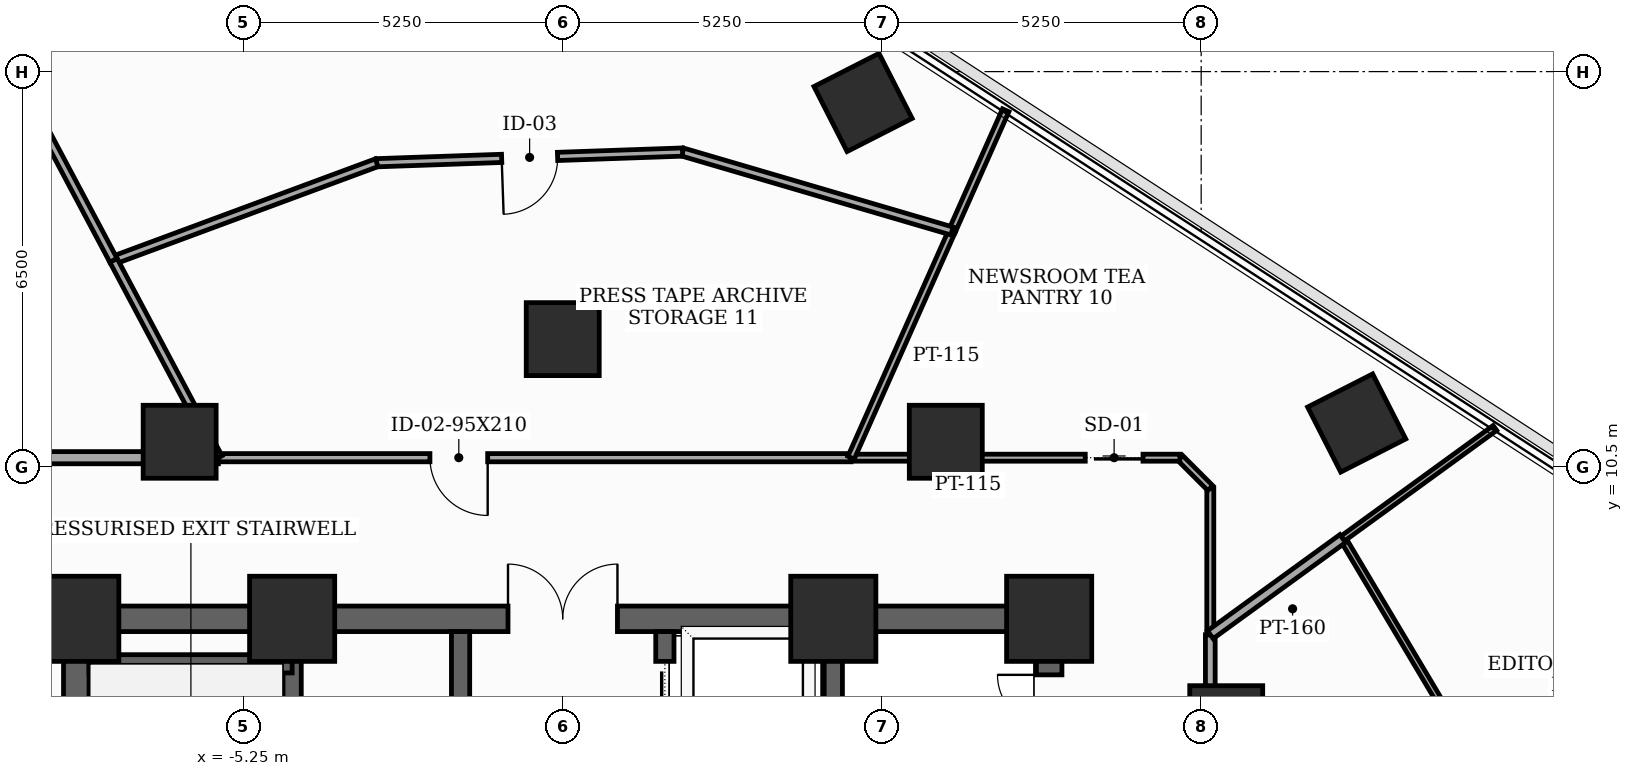
"""IFC4 building model, lengths in metres.
Left out: names, types, materials, properties, quantities, classifications, styles, units other than length and angle.
Written with IfcOpenShell. Run it as: python <this file> out.ifc"""

import sys

from ifc_helpers import new_model, si_unit, direction, frame, frame_2d, origin, origin_2d, place, context, subcontext, project, spatial, rectangle, extrude, element, fill, save


model = new_model("IFC4")
c1 = context("Model", 3, precision=1e-05, world=origin(), true_north=direction((0.0, 1.0)))
c2 = subcontext(c1, "Body", "Model", "MODEL_VIEW")
j1 = project(units=[si_unit("LENGTHUNIT", "METRE"), si_unit("PLANEANGLEUNIT", "RADIAN")], contexts=[c1])
p1 = place(None, origin())
s1 = spatial("IfcSite", under=j1, at=p1, CompositionType="ELEMENT")
p2 = place(p1, origin())
s2 = spatial("IfcBuilding", under=s1, at=p2, CompositionType="ELEMENT")
p3 = place(p2, frame((0.0, 0.0, 145.8)))
s3 = spatial("IfcBuildingStorey", under=s2, at=p3, CompositionType="ELEMENT", Elevation=145.8)
for number, where, z_axis, x_axis in (
    (1, (8.0, 8.0, 0.0), (0.0, 0.0, 1.0), (1.0, 0.0, 0.0)),
    (2, (4.45, 8.0, 0.0), (0.0, 0.0, 1.0), (1.0, 0.0, 0.0)),
    (3, (-4.45, 8.0, 0.0), (0.0, 0.0, 1.0), (1.0, 0.0, 0.0)),
    (4, (-8.0, 8.0, 0.0), (0.0, 0.0, 1.0), (1.0, 0.0, 0.0)),
):
    element("IfcColumn", number, at=place(p3, frame(where, z_axis=z_axis, x_axis=x_axis)), inside=s3, PredefinedType="COLUMN", context=c2, shape_type="SweptSolid", body=[
        extrude(rectangle(XDim=1.4, YDim=1.4, at=origin_2d()), origin(), (0.0, 0.0, 1.0), 3.7),
    ])
for number, where, z_axis, x_axis in (
    (5, (10.912, 6.3, 0.0), (0.0, 0.0, 1.0), (1.0, 0.0, 0.0)),
    (6, (6.3, 10.912, 0.0), (0.0, 0.0, 1.0), (1.0, 0.0, 0.0)),
    (7, (0.0, 12.6, 0.0), (0.0, 0.0, 1.0), (1.0, 0.0, 0.0)),
    (8, (-6.3, 10.912, 0.0), (0.0, 0.0, 1.0), (1.0, 0.0, 0.0)),
    (9, (13.058, 11.22, 0.0), (0.0, 0.0, 1.0), (0.891, 0.454, 0.0)),
    (10, (4.939, 16.492, 0.0), (0.0, 0.0, 1.0), (0.891, 0.454, 0.0)),
):
    element("IfcColumn", number, at=place(p3, frame(where, z_axis=z_axis, x_axis=x_axis)), inside=s3, PredefinedType="COLUMN", context=c2, shape_type="SweptSolid", body=[
        extrude(rectangle(XDim=1.2, YDim=1.2, at=origin_2d()), origin(), (0.0, 0.0, 1.0), 3.7),
    ])
p4 = place(p3, frame((-8.0, -8.0, 0.0), z_axis=(0.0, 0.0, 1.0), x_axis=(0.0, 1.0, 0.0)))
e11 = element("IfcWall", 11, at=p4, inside=s3, PredefinedType="SHEAR", context=c2, shape_type="SweptSolid", body=[
    extrude(rectangle(XDim=16.0, YDim=0.42, at=frame_2d((8.0, 0.0))), origin(), (0.0, 0.0, 1.0), 3.46),
])
p5 = place(p4, frame((0.922, 0.0, 0.0)))
e12 = element("IfcOpeningElement", 12, at=p5, cuts=e11, PredefinedType="OPENING", context=c2, shape_type="SweptSolid", body=[
    extrude(rectangle(XDim=0.85, YDim=2.02, at=frame_2d((0.425, 1.01))), frame((0.0, 0.22, 0.0), z_axis=(0.0, -1.0, 0.0), x_axis=(1.0, 0.0, 0.0)), (0.0, 0.0, 1.0), 0.44),
])
p6 = place(p4, frame((5.35, 0.0, 0.0)))
e13 = element("IfcOpeningElement", 13, at=p6, cuts=e11, PredefinedType="OPENING", context=c2, shape_type="SweptSolid", body=[
    extrude(rectangle(XDim=1.05, YDim=2.15, at=frame_2d((0.525, 1.075))), frame((0.0, 0.22, 0.0), z_axis=(0.0, -1.0, 0.0), x_axis=(1.0, 0.0, 0.0)), (0.0, 0.0, 1.0), 0.44),
])
p7 = place(p3, frame((8.0, -8.0, 0.0), z_axis=(0.0, 0.0, 1.0), x_axis=(0.0, 1.0, 0.0)))
e14 = element("IfcWall", 14, at=p7, inside=s3, PredefinedType="SHEAR", context=c2, shape_type="SweptSolid", body=[
    extrude(rectangle(XDim=16.0, YDim=0.42, at=frame_2d((8.0, 0.0))), origin(), (0.0, 0.0, 1.0), 3.46),
])
p8 = place(p7, frame((9.6, 0.0, 0.0)))
e15 = element("IfcOpeningElement", 15, at=p8, cuts=e14, PredefinedType="OPENING", context=c2, shape_type="SweptSolid", body=[
    extrude(rectangle(XDim=1.05, YDim=2.15, at=frame_2d((0.525, 1.075))), frame((0.0, 0.22, 0.0), z_axis=(0.0, -1.0, 0.0), x_axis=(1.0, 0.0, 0.0)), (0.0, 0.0, 1.0), 0.44),
])
p9 = place(p7, frame((14.229, 0.0, 0.0)))
e16 = element("IfcOpeningElement", 16, at=p9, cuts=e14, PredefinedType="OPENING", context=c2, shape_type="SweptSolid", body=[
    extrude(rectangle(XDim=0.85, YDim=2.02, at=frame_2d((0.425, 1.01))), frame((0.0, 0.22, 0.0), z_axis=(0.0, -1.0, 0.0), x_axis=(1.0, 0.0, 0.0)), (0.0, 0.0, 1.0), 0.44),
])
p10 = place(p3, frame((-8.0, 8.0, 0.0), z_axis=(0.0, 0.0, 1.0), x_axis=(1.0, 0.0, 0.0)))
e17 = element("IfcWall", 17, at=p10, inside=s3, PredefinedType="SHEAR", context=c2, shape_type="SweptSolid", body=[
    extrude(rectangle(XDim=16.0, YDim=0.42, at=frame_2d((8.0, 0.0))), origin(), (0.0, 0.0, 1.0), 3.46),
])
p11 = place(p10, frame((7.1, 0.0, 0.0)))
e18 = element("IfcOpeningElement", 18, at=p11, cuts=e17, PredefinedType="OPENING", context=c2, shape_type="SweptSolid", body=[
    extrude(rectangle(XDim=1.8, YDim=2.15, at=frame_2d((0.9, 1.075))), frame((0.0, 0.22, 0.0), z_axis=(0.0, -1.0, 0.0), x_axis=(1.0, 0.0, 0.0)), (0.0, 0.0, 1.0), 0.44),
])
for number, where, z_axis, x_axis in (
    (19, (-4.45, -7.79, 0.0), (0.0, 0.0, 1.0), (0.0, 1.0, 0.0)),
    (20, (4.45, -7.79, 0.0), (0.0, 0.0, 1.0), (0.0, 1.0, 0.0)),
):
    element("IfcWall", number, at=place(p3, frame(where, z_axis=z_axis, x_axis=x_axis)), inside=s3, PredefinedType="SHEAR", context=c2, shape_type="SweptSolid", body=[
        extrude(rectangle(XDim=15.58, YDim=0.3, at=frame_2d((7.79, 0.0))), origin(), (0.0, 0.0, 1.0), 3.46),
    ])
p12 = place(p3, frame((-7.79, 7.26, 0.0), z_axis=(0.0, 0.0, 1.0), x_axis=(1.0, 0.0, 0.0)))
e21 = element("IfcWall", 21, at=p12, inside=s3, PredefinedType="SHEAR", context=c2, shape_type="SweptSolid", body=[
    extrude(rectangle(XDim=3.34, YDim=0.3, at=frame_2d((1.67, 0.0))), origin(), (0.0, 0.0, 1.0), 3.46),
])
p13 = place(p3, frame((-1.68, -4.85, 0.0), z_axis=(0.0, 0.0, 1.0), x_axis=(0.0, 1.0, 0.0)))
e22 = element("IfcWall", 22, at=p13, inside=s3, PredefinedType="SHEAR", context=c2, shape_type="SweptSolid", body=[
    extrude(rectangle(XDim=12.64, YDim=0.3, at=frame_2d((6.32, 0.0))), origin(), (0.0, 0.0, 1.0), 3.46),
])
p14 = place(p13, frame((1.05, 0.0, 0.0)))
e23 = element("IfcOpeningElement", 23, at=p14, cuts=e22, PredefinedType="OPENING", context=c2, shape_type="SweptSolid", body=[
    extrude(rectangle(XDim=0.85, YDim=2.02, at=frame_2d((0.425, 1.01))), frame((0.0, 0.16, 0.0), z_axis=(0.0, -1.0, 0.0), x_axis=(1.0, 0.0, 0.0)), (0.0, 0.0, 1.0), 0.32),
])
p15 = place(p13, frame((6.8, 0.0, 0.0)))
e24 = element("IfcOpeningElement", 24, at=p15, cuts=e22, PredefinedType="OPENING", context=c2, shape_type="SweptSolid", body=[
    extrude(rectangle(XDim=0.95, YDim=2.1, at=frame_2d((0.475, 1.05))), frame((0.0, 0.16, 0.0), z_axis=(0.0, -1.0, 0.0), x_axis=(1.0, 0.0, 0.0)), (0.0, 0.0, 1.0), 0.32),
])
p16 = place(p3, frame((1.68, -4.85, 0.0), z_axis=(0.0, 0.0, 1.0), x_axis=(0.0, 1.0, 0.0)))
e25 = element("IfcWall", 25, at=p16, inside=s3, PredefinedType="SHEAR", context=c2, shape_type="SweptSolid", body=[
    extrude(rectangle(XDim=12.64, YDim=0.3, at=frame_2d((6.32, 0.0))), origin(), (0.0, 0.0, 1.0), 3.46),
])
p17 = place(p16, frame((0.55, 0.0, 0.0)))
e26 = element("IfcOpeningElement", 26, at=p17, cuts=e25, PredefinedType="OPENING", context=c2, shape_type="SweptSolid", body=[
    extrude(rectangle(XDim=1.1, YDim=2.1, at=frame_2d((0.55, 1.05))), frame((0.0, 0.16, 0.0), z_axis=(0.0, -1.0, 0.0), x_axis=(1.0, 0.0, 0.0)), (0.0, 0.0, 1.0), 0.32),
])
p18 = place(p16, frame((2.65, 0.0, 0.0)))
e27 = element("IfcOpeningElement", 27, at=p18, cuts=e25, PredefinedType="OPENING", context=c2, shape_type="SweptSolid", body=[
    extrude(rectangle(XDim=1.1, YDim=2.1, at=frame_2d((0.55, 1.05))), frame((0.0, 0.16, 0.0), z_axis=(0.0, -1.0, 0.0), x_axis=(1.0, 0.0, 0.0)), (0.0, 0.0, 1.0), 0.32),
])
p19 = place(p16, frame((4.75, 0.0, 0.0)))
e28 = element("IfcOpeningElement", 28, at=p19, cuts=e25, PredefinedType="OPENING", context=c2, shape_type="SweptSolid", body=[
    extrude(rectangle(XDim=1.1, YDim=2.1, at=frame_2d((0.55, 1.05))), frame((0.0, 0.16, 0.0), z_axis=(0.0, -1.0, 0.0), x_axis=(1.0, 0.0, 0.0)), (0.0, 0.0, 1.0), 0.32),
])
p20 = place(p16, frame((6.85, 0.0, 0.0)))
e29 = element("IfcOpeningElement", 29, at=p20, cuts=e25, PredefinedType="OPENING", context=c2, shape_type="SweptSolid", body=[
    extrude(rectangle(XDim=1.1, YDim=2.1, at=frame_2d((0.55, 1.05))), frame((0.0, 0.16, 0.0), z_axis=(0.0, -1.0, 0.0), x_axis=(1.0, 0.0, 0.0)), (0.0, 0.0, 1.0), 0.32),
])
p21 = place(p16, frame((8.95, 0.0, 0.0)))
e30 = element("IfcOpeningElement", 30, at=p21, cuts=e25, PredefinedType="OPENING", context=c2, shape_type="SweptSolid", body=[
    extrude(rectangle(XDim=1.1, YDim=2.1, at=frame_2d((0.55, 1.05))), frame((0.0, 0.16, 0.0), z_axis=(0.0, -1.0, 0.0), x_axis=(1.0, 0.0, 0.0)), (0.0, 0.0, 1.0), 0.32),
])
p22 = place(p16, frame((11.05, 0.0, 0.0)))
e31 = element("IfcOpeningElement", 31, at=p22, cuts=e25, PredefinedType="OPENING", context=c2, shape_type="SweptSolid", body=[
    extrude(rectangle(XDim=1.1, YDim=2.1, at=frame_2d((0.55, 1.05))), frame((0.0, 0.16, 0.0), z_axis=(0.0, -1.0, 0.0), x_axis=(1.0, 0.0, 0.0)), (0.0, 0.0, 1.0), 0.32),
])
p23 = place(p3, frame((10.65, 2.264, 0.0), z_axis=(0.0, 0.0, 1.0), x_axis=(0.0, 1.0, 0.0)))
e32 = element("IfcWall", 32, at=p23, inside=s3, PredefinedType="PARTITIONING", context=c2, shape_type="SweptSolid", body=[
    extrude(rectangle(XDim=5.474, YDim=0.16, at=frame_2d((2.737, 0.0))), origin(), (0.0, 0.0, 1.0), 2.045),
])
p24 = place(p23, frame((0.595, 0.0, 0.0)))
e33 = element("IfcOpeningElement", 33, at=p24, cuts=e32, PredefinedType="OPENING", context=c2, shape_type="SweptSolid", body=[
    extrude(rectangle(XDim=1.0, YDim=2.0, at=frame_2d((0.5, 1.0))), frame((0.0, 0.09, 0.0), z_axis=(0.0, -1.0, 0.0), x_axis=(1.0, 0.0, 0.0)), (0.0, 0.0, 1.0), 0.18),
])
p25 = place(p3, frame((10.65, 7.738, 0.0), z_axis=(0.0, 0.0, 1.0), x_axis=(0.0, 1.0, 0.0)))
e34 = element("IfcWall", 34, at=p25, inside=s3, PredefinedType="PARTITIONING", context=c2, shape_type="SweptSolid", body=[
    extrude(rectangle(XDim=2.412, YDim=0.115, at=frame_2d((1.206, 0.0))), origin(), (0.0, 0.0, 1.0), 3.46),
])
p26 = place(p3, frame((10.65, 10.15, 0.0), z_axis=(0.0, 0.0, 1.0), x_axis=(-0.707106781187, 0.707106781187, 0.0)))
e35 = element("IfcWall", 35, at=p26, inside=s3, PredefinedType="PARTITIONING", context=c2, shape_type="SweptSolid", body=[
    extrude(rectangle(XDim=0.707, YDim=0.115, at=frame_2d((0.354, 0.0))), origin(), (0.0, 0.0, 1.0), 3.46),
])
p27 = place(p3, frame((10.15, 10.65, 0.0), z_axis=(0.0, 0.0, 1.0), x_axis=(-1.0, 0.0, 0.0)))
e36 = element("IfcWall", 36, at=p27, inside=s3, PredefinedType="PARTITIONING", context=c2, shape_type="SweptSolid", body=[
    extrude(rectangle(XDim=5.408, YDim=0.115, at=frame_2d((2.704, 0.0))), origin(), (0.0, 0.0, 1.0), 2.045),
])
p28 = place(p27, frame((0.607, 0.0, 0.0)))
e37 = element("IfcOpeningElement", 37, at=p28, cuts=e36, PredefinedType="OPENING", context=c2, shape_type="SweptSolid", body=[
    extrude(rectangle(XDim=0.95, YDim=2.0, at=frame_2d((0.475, 1.0))), frame((0.0, 0.067, 0.0), z_axis=(0.0, -1.0, 0.0), x_axis=(1.0, 0.0, 0.0)), (0.0, 0.0, 1.0), 0.135),
])
p29 = place(p3, frame((4.742, 10.65, 0.0), z_axis=(0.0, 0.0, 1.0), x_axis=(-1.0, 0.0, 0.0)))
e38 = element("IfcWall", 38, at=p29, inside=s3, PredefinedType="PARTITIONING", context=c2, shape_type="SweptSolid", body=[
    extrude(rectangle(XDim=10.405, YDim=0.135, at=frame_2d((5.203, 0.0))), origin(), (0.0, 0.0, 1.0), 2.745),
])
p30 = place(p29, frame((5.976, 0.0, 0.0)))
e39 = element("IfcOpeningElement", 39, at=p30, cuts=e38, PredefinedType="OPENING", context=c2, shape_type="SweptSolid", body=[
    extrude(rectangle(XDim=0.95, YDim=2.1, at=frame_2d((0.475, 1.05))), frame((0.0, 0.077, 0.0), z_axis=(0.0, -1.0, 0.0), x_axis=(1.0, 0.0, 0.0)), (0.0, 0.0, 1.0), 0.155),
])
p31 = place(p3, frame((-5.663, 10.65, 0.0), z_axis=(0.0, 0.0, 1.0), x_axis=(-1.0, 0.0, 0.0)))
e40 = element("IfcWall", 40, at=p31, inside=s3, PredefinedType="SOLIDWALL", context=c2, shape_type="SweptSolid", body=[
    extrude(rectangle(XDim=4.487, YDim=0.2, at=frame_2d((2.243, 0.0))), origin(), (0.0, 0.0, 1.0), 2.745),
])
p32 = place(p3, frame((12.828, 9.32, 0.0), z_axis=(0.0, 0.0, 1.0), x_axis=(0.511214896397, -0.859452924657, 0.0)))
e41 = element("IfcWall", 41, at=p32, inside=s3, PredefinedType="MOVABLE", context=c2, shape_type="SweptSolid", body=[
    extrude(rectangle(XDim=3.32, YDim=0.1, at=frame_2d((1.66, 0.0))), origin(), (0.0, 0.0, 1.0), 2.045),
])
p33 = place(p3, frame((15.331, 11.139, 0.0), z_axis=(0.0, 0.0, 1.0), x_axis=(-0.809015759361, -0.58778695214, 0.0)))
e42 = element("IfcWall", 42, at=p33, inside=s3, PredefinedType="MOVABLE", context=c2, shape_type="SweptSolid", body=[
    extrude(rectangle(XDim=3.094, YDim=0.1, at=frame_2d((1.547, 0.0))), origin(), (0.0, 0.0, 1.0), 2.045),
])
p34 = place(p3, frame((12.828, 9.32, 0.0), z_axis=(0.0, 0.0, 1.0), x_axis=(-0.809081072469, -0.587697046251, 0.0)))
e43 = element("IfcWall", 43, at=p34, inside=s3, PredefinedType="PARTITIONING", context=c2, shape_type="SweptSolid", body=[
    extrude(rectangle(XDim=2.692, YDim=0.16, at=frame_2d((1.346, 0.0))), origin(), (0.0, 0.0, 1.0), 2.045),
])
p35 = place(p3, frame((6.402, 14.378, 0.0), z_axis=(0.0, 0.0, 1.0), x_axis=(-0.406804441844, -0.913515268671, 0.0)))
e44 = element("IfcWall", 44, at=p35, inside=s3, PredefinedType="PARTITIONING", context=c2, shape_type="SweptSolid", body=[
    extrude(rectangle(XDim=4.081, YDim=0.115, at=frame_2d((2.041, 0.0))), origin(), (0.0, 0.0, 1.0), 2.045),
])
p36 = place(p3, frame((7.285, 16.364, 0.0), z_axis=(0.0, 0.0, 1.0), x_axis=(-0.406367721617, -0.913709622817, 0.0)))
e45 = element("IfcWall", 45, at=p36, inside=s3, PredefinedType="PARTITIONING", context=c2, shape_type="SweptSolid", body=[
    extrude(rectangle(XDim=2.174, YDim=0.115, at=frame_2d((1.087, 0.0))), origin(), (0.0, 0.0, 1.0), 2.045),
])
p37 = place(p3, frame((6.402, 14.378, 0.0), z_axis=(0.0, 0.0, 1.0), x_axis=(-0.959611810986, 0.2813275177, 0.0)))
e46 = element("IfcWall", 46, at=p37, inside=s3, PredefinedType="PARTITIONING", context=c2, shape_type="SweptSolid", body=[
    extrude(rectangle(XDim=4.618, YDim=0.135, at=frame_2d((2.309, 0.0))), origin(), (0.0, 0.0, 1.0), 2.045),
])
p38 = place(p3, frame((1.971, 15.677, 0.0), z_axis=(0.0, 0.0, 1.0), x_axis=(-0.999388477448, -0.034966714817, 0.0)))
e47 = element("IfcWall", 47, at=p38, inside=s3, PredefinedType="PARTITIONING", context=c2, shape_type="SweptSolid", body=[
    extrude(rectangle(XDim=5.034, YDim=0.135, at=frame_2d((2.517, 0.0))), origin(), (0.0, 0.0, 1.0), 2.045),
])
p39 = place(p38, frame((2.057, 0.0, 0.0)))
e48 = element("IfcOpeningElement", 48, at=p39, cuts=e47, PredefinedType="OPENING", context=c2, shape_type="SweptSolid", body=[
    extrude(rectangle(XDim=0.92, YDim=2.0, at=frame_2d((0.46, 1.0))), frame((0.0, 0.077, 0.0), z_axis=(0.0, -1.0, 0.0), x_axis=(1.0, 0.0, 0.0)), (0.0, 0.0, 1.0), 0.155),
])
p40 = place(p3, frame((-3.06, 15.501, 0.0), z_axis=(0.0, 0.0, 1.0), x_axis=(-0.937697715957, -0.347452145611, 0.0)))
e49 = element("IfcWall", 49, at=p40, inside=s3, PredefinedType="PARTITIONING", context=c2, shape_type="SweptSolid", body=[
    extrude(rectangle(XDim=4.616, YDim=0.135, at=frame_2d((2.308, 0.0))), origin(), (0.0, 0.0, 1.0), 2.045),
])
p41 = place(p3, frame((-7.389, 13.897, 0.0), z_axis=(0.0, 0.0, 1.0), x_axis=(0.469329971657, -0.883022863636, 0.0)))
e50 = element("IfcWall", 50, at=p41, inside=s3, PredefinedType="PARTITIONING", context=c2, shape_type="SweptSolid", body=[
    extrude(rectangle(XDim=3.677, YDim=0.135, at=frame_2d((1.839, 0.0))), origin(), (0.0, 0.0, 1.0), 2.045),
])
p42 = place(p3, frame((-14.797, 27.829, 0.0), z_axis=(0.0, 0.0, 1.0), x_axis=(0.469495702595, -0.882934757072, 0.0)))
e51 = element("IfcWall", 51, at=p42, inside=s3, PredefinedType="PARTITIONING", context=c2, shape_type="SweptSolid", body=[
    extrude(rectangle(XDim=15.779, YDim=0.135, at=frame_2d((7.89, 0.0))), origin(), (0.0, 0.0, 1.0), 2.045),
])
p43 = place(p9, origin())
e52 = element("IfcDoor", 52, at=p43, inside=s3, OperationType="SINGLE_SWING_RIGHT", PredefinedType="TRAPDOOR", context=c2, shape_type="SweptSolid", body=[
    extrude(rectangle(XDim=0.85, YDim=2.02, at=frame_2d((0.425, 1.01))), frame((0.0, 0.025, 0.0), z_axis=(0.0, -1.0, 0.0), x_axis=(1.0, 0.0, 0.0)), (0.0, 0.0, 1.0), 0.05),
])
fill(e16, e52)
p44 = place(p11, origin())
e53 = element("IfcDoor", 53, at=p44, inside=s3, OperationType="DOUBLE_DOOR_SINGLE_SWING", PredefinedType="DOOR", context=c2, shape_type="SweptSolid", body=[
    extrude(rectangle(XDim=1.8, YDim=2.15, at=frame_2d((0.9, 1.075))), frame((0.0, 0.025, 0.0), z_axis=(0.0, -1.0, 0.0), x_axis=(1.0, 0.0, 0.0)), (0.0, 0.0, 1.0), 0.05),
])
fill(e18, e53)
p45 = place(p22, origin())
e54 = element("IfcDoor", 54, at=p45, inside=s3, OperationType="SLIDING_TO_LEFT", PredefinedType="DOOR", context=c2, shape_type="SweptSolid", body=[
    extrude(rectangle(XDim=1.1, YDim=2.1, at=frame_2d((0.55, 1.05))), frame((0.0, 0.025, 0.0), z_axis=(0.0, -1.0, 0.0), x_axis=(1.0, 0.0, 0.0)), (0.0, 0.0, 1.0), 0.05),
])
fill(e31, e54)
p46 = place(p28, origin())
e55 = element("IfcDoor", 55, at=p46, inside=s3, OperationType="SLIDING_TO_LEFT", PredefinedType="DOOR", context=c2, shape_type="SweptSolid", body=[
    extrude(rectangle(XDim=0.95, YDim=2.0, at=frame_2d((0.475, 1.0))), frame((0.0, 0.025, 0.0), z_axis=(0.0, -1.0, 0.0), x_axis=(1.0, 0.0, 0.0)), (0.0, 0.0, 1.0), 0.05),
])
fill(e37, e55)
p47 = place(p30, origin())
e56 = element("IfcDoor", 56, at=p47, inside=s3, OperationType="SINGLE_SWING_LEFT", PredefinedType="DOOR", context=c2, shape_type="SweptSolid", body=[
    extrude(rectangle(XDim=0.95, YDim=2.1, at=frame_2d((0.475, 1.05))), frame((0.0, 0.025, 0.0), z_axis=(0.0, -1.0, 0.0), x_axis=(1.0, 0.0, 0.0)), (0.0, 0.0, 1.0), 0.05),
])
fill(e39, e56)
p48 = place(p39, origin())
e57 = element("IfcDoor", 57, at=p48, inside=s3, OperationType="SINGLE_SWING_RIGHT", PredefinedType="DOOR", context=c2, shape_type="SweptSolid", body=[
    extrude(rectangle(XDim=0.92, YDim=2.0, at=frame_2d((0.46, 1.0))), frame((0.0, 0.025, 0.0), z_axis=(0.0, -1.0, 0.0), x_axis=(1.0, 0.0, 0.0)), (0.0, 0.0, 1.0), 0.05),
])
fill(e48, e57)
save(model, sys.argv[1])
